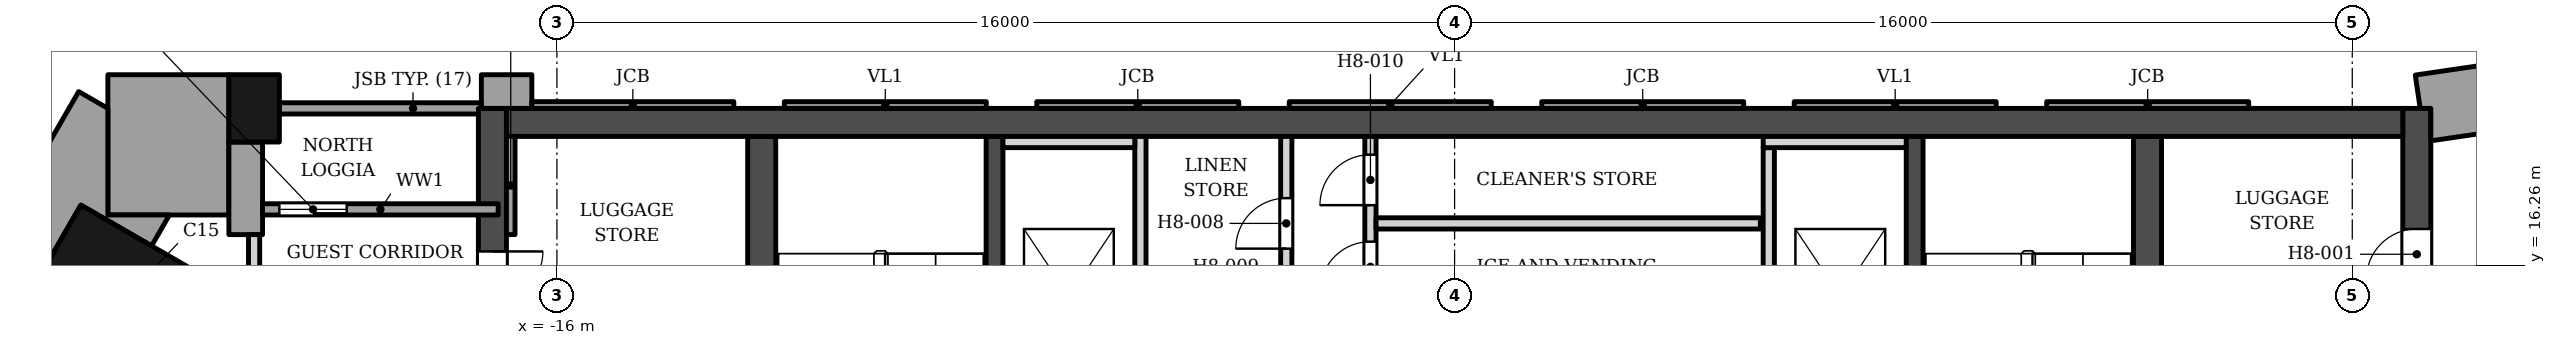
"""IFC4 building model, lengths in metres.
Left out: names, types, materials, properties, quantities, classifications, styles, units other than length and angle.
Written with IfcOpenShell. Run it as: python <this file> out.ifc"""

import sys

from ifc_helpers import new_model, si_unit, direction, frame, frame_2d, origin, origin_2d, place, context, subcontext, project, spatial, polyline, rectangle, outline, extrude, element, fill, save


model = new_model("IFC4")
c1 = context("Model", 3, precision=1e-05, world=origin(), true_north=direction((0.0, 1.0)))
c2 = subcontext(c1, "Body", "Model", "MODEL_VIEW")
j1 = project(units=[si_unit("LENGTHUNIT", "METRE"), si_unit("PLANEANGLEUNIT", "RADIAN")], contexts=[c1])
p1 = place(None, origin())
s1 = spatial("IfcSite", under=j1, at=p1, CompositionType="ELEMENT")
p2 = place(p1, origin())
s2 = spatial("IfcBuilding", under=s1, at=p2, CompositionType="ELEMENT")
p3 = place(p2, frame((0.0, 0.0, 122.4)))
s3 = spatial("IfcBuildingStorey", under=s2, at=p3, CompositionType="ELEMENT", Elevation=122.4)
p4 = place(p3, frame((-16.9, 18.802, 0.0), z_axis=(0.0, 0.0, 1.0), x_axis=(1.0, 0.0, 0.0)))
e1 = element("IfcWall", 1, at=p4, inside=s3, PredefinedType="SHEAR", context=c2, shape_type="SweptSolid", body=[
    extrude(rectangle(XDim=33.8, YDim=0.5, at=frame_2d((16.9, 0.0))), origin(), (0.0, 0.0, 1.0), 3.4),
])
p5 = place(p3, frame((-12.35, 5.253, 0.0), z_axis=(0.0, 0.0, 1.0), x_axis=(0.0, 1.0, 0.0)))
e2 = element("IfcWall", 2, at=p5, inside=s3, PredefinedType="SHEAR", context=c2, shape_type="SweptSolid", body=[
    extrude(rectangle(XDim=13.3, YDim=0.5, at=frame_2d((6.65, 0.0))), origin(), (0.0, 0.0, 1.0), 3.4),
])
p6 = place(p3, frame((-8.2, 5.253, 0.0), z_axis=(0.0, 0.0, 1.0), x_axis=(0.0, 1.0, 0.0)))
e3 = element("IfcWall", 3, at=p6, inside=s3, PredefinedType="SHEAR", context=c2, shape_type="SweptSolid", body=[
    extrude(rectangle(XDim=13.3, YDim=0.3, at=frame_2d((6.65, 0.0))), origin(), (0.0, 0.0, 1.0), 3.4),
])
p7 = place(p6, frame((7.1, 0.0, 0.0)))
e4 = element("IfcOpeningElement", 4, at=p7, cuts=e3, PredefinedType="OPENING", context=c2, shape_type="SweptSolid", body=[
    extrude(rectangle(XDim=1.4, YDim=2.1, at=frame_2d((0.7, 1.05))), frame((0.0, 0.16, 0.0), z_axis=(0.0, -1.0, 0.0), x_axis=(1.0, 0.0, 0.0)), (0.0, 0.0, 1.0), 0.32),
])
p8 = place(p6, frame((5.05, 0.0, 0.0)))
e5 = element("IfcOpeningElement", 5, at=p8, cuts=e3, PredefinedType="OPENING", context=c2, shape_type="SweptSolid", body=[
    extrude(rectangle(XDim=1.4, YDim=2.1, at=frame_2d((0.7, 1.05))), frame((0.0, 0.16, 0.0), z_axis=(0.0, -1.0, 0.0), x_axis=(1.0, 0.0, 0.0)), (0.0, 0.0, 1.0), 0.32),
])
p9 = place(p3, frame((12.35, 5.253, 0.0), z_axis=(0.0, 0.0, 1.0), x_axis=(0.0, 1.0, 0.0)))
e6 = element("IfcWall", 6, at=p9, inside=s3, PredefinedType="SHEAR", context=c2, shape_type="SweptSolid", body=[
    extrude(rectangle(XDim=13.3, YDim=0.5, at=frame_2d((6.65, 0.0))), origin(), (0.0, 0.0, 1.0), 3.4),
])
p10 = place(p3, frame((8.2, 5.253, 0.0), z_axis=(0.0, 0.0, 1.0), x_axis=(0.0, 1.0, 0.0)))
e7 = element("IfcWall", 7, at=p10, inside=s3, PredefinedType="SHEAR", context=c2, shape_type="SweptSolid", body=[
    extrude(rectangle(XDim=13.3, YDim=0.3, at=frame_2d((6.65, 0.0))), origin(), (0.0, 0.0, 1.0), 3.4),
])
p11 = place(p10, frame((7.1, 0.0, 0.0)))
e8 = element("IfcOpeningElement", 8, at=p11, cuts=e7, PredefinedType="OPENING", context=c2, shape_type="SweptSolid", body=[
    extrude(rectangle(XDim=1.4, YDim=2.1, at=frame_2d((0.7, 1.05))), frame((0.0, 0.16, 0.0), z_axis=(0.0, -1.0, 0.0), x_axis=(1.0, 0.0, 0.0)), (0.0, 0.0, 1.0), 0.32),
])
p12 = place(p10, frame((5.05, 0.0, 0.0)))
e9 = element("IfcOpeningElement", 9, at=p12, cuts=e7, PredefinedType="OPENING", context=c2, shape_type="SweptSolid", body=[
    extrude(rectangle(XDim=1.4, YDim=2.1, at=frame_2d((0.7, 1.05))), frame((0.0, 0.16, 0.0), z_axis=(0.0, -1.0, 0.0), x_axis=(1.0, 0.0, 0.0)), (0.0, 0.0, 1.0), 0.32),
])
p13 = place(p3, frame((-17.15, 5.853, 0.0), z_axis=(0.0, 0.0, 1.0), x_axis=(0.0, 1.0, 0.0)))
e10 = element("IfcWall", 10, at=p13, inside=s3, PredefinedType="SHEAR", context=c2, shape_type="SweptSolid", body=[
    extrude(rectangle(XDim=13.2, YDim=0.5, at=frame_2d((6.6, 0.0))), origin(), (0.0, 0.0, 1.0), 3.4),
])
p14 = place(p13, frame((4.1, 0.0, 0.0)))
e11 = element("IfcOpeningElement", 11, at=p14, cuts=e10, PredefinedType="OPENING", context=c2, shape_type="SweptSolid", body=[
    extrude(rectangle(XDim=1.6, YDim=2.1, at=frame_2d((0.8, 1.05))), frame((0.0, 0.26, 0.0), z_axis=(0.0, -1.0, 0.0), x_axis=(1.0, 0.0, 0.0)), (0.0, 0.0, 1.0), 0.52),
])
p15 = place(p13, frame((9.75, 0.0, 0.0)))
e12 = element("IfcOpeningElement", 12, at=p15, cuts=e10, PredefinedType="OPENING", context=c2, shape_type="SweptSolid", body=[
    extrude(rectangle(XDim=0.9, YDim=2.1, at=frame_2d((0.45, 1.05))), frame((0.0, 0.26, 0.0), z_axis=(0.0, -1.0, 0.0), x_axis=(1.0, 0.0, 0.0)), (0.0, 0.0, 1.0), 0.52),
])
p16 = place(p3, frame((17.15, 5.853, 0.0), z_axis=(0.0, 0.0, 1.0), x_axis=(0.0, 1.0, 0.0)))
e13 = element("IfcWall", 13, at=p16, inside=s3, PredefinedType="SHEAR", context=c2, shape_type="SweptSolid", body=[
    extrude(rectangle(XDim=13.2, YDim=0.5, at=frame_2d((6.6, 0.0))), origin(), (0.0, 0.0, 1.0), 3.4),
])
p17 = place(p16, frame((4.1, 0.0, 0.0)))
e14 = element("IfcOpeningElement", 14, at=p17, cuts=e13, PredefinedType="OPENING", context=c2, shape_type="SweptSolid", body=[
    extrude(rectangle(XDim=1.6, YDim=2.1, at=frame_2d((0.8, 1.05))), frame((0.0, 0.26, 0.0), z_axis=(0.0, -1.0, 0.0), x_axis=(1.0, 0.0, 0.0)), (0.0, 0.0, 1.0), 0.52),
])
p18 = place(p16, frame((10.15, 0.0, 0.0)))
e15 = element("IfcOpeningElement", 15, at=p18, cuts=e13, PredefinedType="OPENING", context=c2, shape_type="SweptSolid", body=[
    extrude(rectangle(XDim=0.9, YDim=2.1, at=frame_2d((0.45, 1.05))), frame((0.0, 0.26, 0.0), z_axis=(0.0, -1.0, 0.0), x_axis=(1.0, 0.0, 0.0)), (0.0, 0.0, 1.0), 0.52),
])
p19 = place(p3, frame((-23.963, 15.382, 0.0), z_axis=(0.0, 0.0, 1.0), x_axis=(0.866025403784, -0.5, 0.0)))
e16 = element("IfcColumn", 16, at=p19, inside=s3, PredefinedType="COLUMN", context=c2, shape_type="SweptSolid", body=[
    extrude(rectangle(XDim=2.85, YDim=2.85, at=origin_2d()), origin(), (0.0, 0.0, 1.0), 3.4),
])
p20 = place(p3, frame((-21.397, 19.053, 0.0), z_axis=(0.0, 0.0, 1.0), x_axis=(-1.0, 0.0, 0.0)))
e17 = element("IfcColumn", 17, at=p20, inside=s3, PredefinedType="COLUMN", context=c2, shape_type="SweptSolid", body=[
    extrude(rectangle(XDim=0.9, YDim=1.2, at=origin_2d()), origin(), (0.0, 0.0, 1.0), 3.4),
])
p21 = place(p3, origin())
e18 = element("IfcWall", 18, at=p21, inside=s3, PredefinedType="SOLIDWALL", context=c2, shape_type="SweptSolid", body=[
    extrude(outline(polyline([(-16.447, 19.052), (-16.447, 19.653), (-17.347, 19.653), (-17.347, 19.052), (-16.447, 19.052)])), origin(), (0.0, 0.0, 1.0), 2.65),
])
p22 = place(p3, origin())
e19 = element("IfcWall", 19, at=p22, inside=s3, PredefinedType="SOLIDWALL", context=c2, shape_type="SweptSolid", body=[
    extrude(outline(polyline([(-16.9, 18.555), (-16.747, 18.555), (-16.747, 16.802), (-16.9, 16.802), (-16.9, 18.555)])), origin(), (0.0, 0.0, 1.0), 2.65),
])
p23 = place(p3, origin())
e20 = element("IfcWall", 20, at=p23, inside=s3, PredefinedType="SOLIDWALL", context=c2, shape_type="SweptSolid", body=[
    extrude(outline(polyline([(-21.847, 18.453), (-21.847, 16.802), (-21.247, 16.802), (-21.247, 18.453), (-21.847, 18.453)])), origin(), (0.0, 0.0, 1.0), 2.63),
])
p24 = place(p3, origin())
e21 = element("IfcWall", 21, at=p24, inside=s3, PredefinedType="SOLIDWALL", context=c2, shape_type="SweptSolid", body=[
    extrude(outline(polyline([(10.553, 19.173), (10.553, 19.052), (14.153, 19.052), (14.153, 19.173), (10.553, 19.173)])), origin(), (0.0, 0.0, 1.0), 2.65),
])
p25 = place(p3, origin())
e22 = element("IfcWall", 22, at=p25, inside=s3, PredefinedType="ELEMENTEDWALL", context=c2, shape_type="SweptSolid", body=[
    extrude(outline(polyline([(6.053, 19.173), (6.053, 19.052), (9.653, 19.052), (9.653, 19.173), (6.053, 19.173)])), origin(), (0.0, 0.0, 1.0), 2.65),
])
p26 = place(p3, origin())
e23 = element("IfcWall", 23, at=p26, inside=s3, PredefinedType="SOLIDWALL", context=c2, shape_type="SweptSolid", body=[
    extrude(outline(polyline([(1.553, 19.173), (1.553, 19.052), (5.153, 19.052), (5.153, 19.173), (1.553, 19.173)])), origin(), (0.0, 0.0, 1.0), 2.65),
])
p27 = place(p3, origin())
e24 = element("IfcWall", 24, at=p27, inside=s3, PredefinedType="ELEMENTEDWALL", context=c2, shape_type="SweptSolid", body=[
    extrude(outline(polyline([(-2.947, 19.173), (-2.947, 19.052), (0.653, 19.052), (0.653, 19.173), (-2.947, 19.173)])), origin(), (0.0, 0.0, 1.0), 2.65),
])
p28 = place(p3, origin())
e25 = element("IfcWall", 25, at=p28, inside=s3, PredefinedType="SOLIDWALL", context=c2, shape_type="SweptSolid", body=[
    extrude(outline(polyline([(-7.447, 19.173), (-7.447, 19.052), (-3.847, 19.052), (-3.847, 19.173), (-7.447, 19.173)])), origin(), (0.0, 0.0, 1.0), 2.65),
])
p29 = place(p3, origin())
e26 = element("IfcWall", 26, at=p29, inside=s3, PredefinedType="ELEMENTEDWALL", context=c2, shape_type="SweptSolid", body=[
    extrude(outline(polyline([(-11.947, 19.173), (-11.947, 19.052), (-8.347, 19.052), (-8.347, 19.173), (-11.947, 19.173)])), origin(), (0.0, 0.0, 1.0), 2.65),
])
p30 = place(p3, origin())
e27 = element("IfcWall", 27, at=p30, inside=s3, PredefinedType="SOLIDWALL", context=c2, shape_type="SweptSolid", body=[
    extrude(outline(polyline([(-16.446, 19.173), (-16.446, 19.052), (-12.847, 19.052), (-12.847, 19.173), (-16.446, 19.173)])), origin(), (0.0, 0.0, 1.0), 2.65),
])
p31 = place(p3, origin())
e28 = element("IfcWall", 28, at=p31, inside=s3, PredefinedType="SOLIDWALL", context=c2, shape_type="SweptSolid", body=[
    extrude(outline(polyline([(-20.947, 19.153), (-20.947, 18.953), (-17.4, 18.953), (-17.4, 19.052), (-17.347, 19.052), (-17.347, 19.153), (-20.947, 19.153)])), origin(), (0.0, 0.0, 1.0), 2.65),
])
p32 = place(p3, frame((-17.047, 17.252, 0.0), z_axis=(0.0, 0.0, 1.0), x_axis=(-1.0, 0.0, 0.0)))
e29 = element("IfcWall", 29, at=p32, inside=s3, PredefinedType="ELEMENTEDWALL", context=c2, shape_type="SweptSolid", body=[
    extrude(rectangle(XDim=4.2, YDim=0.2, at=frame_2d((2.1, 0.0))), origin(), (0.0, 0.0, 1.0), 2.65),
])
p33 = place(p32, frame((2.7, 0.0, 0.0)))
e30 = element("IfcOpeningElement", 30, at=p33, cuts=e29, PredefinedType="OPENING", context=c2, shape_type="SweptSolid", body=[
    extrude(rectangle(XDim=1.2, YDim=2.4, at=frame_2d((0.6, 1.2))), frame((0.0, 0.11, 0.0), z_axis=(0.0, -1.0, 0.0), x_axis=(1.0, 0.0, 0.0)), (0.0, 0.0, 1.0), 0.22),
])
p34 = place(p3, origin())
e31 = element("IfcWall", 31, at=p34, inside=s3, PredefinedType="SOLIDWALL", context=c2, shape_type="SweptSolid", body=[
    extrude(outline(polyline([(-24.004, 17.153), (-21.847, 17.153), (-21.847, 18.453), (-21.847, 18.453), (-21.847, 19.653), (-24.004, 19.653), (-24.004, 17.153)])), origin(), (0.0, 0.0, 1.0), 2.63),
])
p35 = place(p3, origin())
e32 = element("IfcWall", 32, at=p35, inside=s3, PredefinedType="SOLIDWALL", context=c2, shape_type="SweptSolid", body=[
    extrude(outline(polyline([(-23.225, 16.601), (-22.907, 17.153), (-24.004, 17.153), (-24.004, 19.052), (-24.523, 19.353), (-27.682, 13.882), (-25.664, 12.717), (-24.65, 14.133), (-25.91, 14.86), (-24.485, 17.329), (-23.225, 16.601)])), origin(), (0.0, 0.0, 1.0), 2.63),
])
p36 = place(p3, origin())
e33 = element("IfcWall", 33, at=p36, inside=s3, PredefinedType="SOLIDWALL", context=c2, shape_type="SweptSolid", body=[
    extrude(outline(polyline([(17.123, 19.646), (17.21, 19.052), (17.4, 19.052), (17.4, 18.474), (18.664, 18.659), (18.49, 19.847), (17.123, 19.646)])), origin(), (0.0, 0.0, 1.0), 2.65),
])
p37 = place(p3, frame((-5.6, 14.253, 0.0), z_axis=(0.0, 0.0, 1.0), x_axis=(0.0, 1.0, 0.0)))
e34 = element("IfcWall", 34, at=p37, inside=s3, PredefinedType="SOLIDWALL", context=c2, shape_type="SweptSolid", body=[
    extrude(rectangle(XDim=4.3, YDim=0.2, at=frame_2d((2.15, 0.0))), origin(), (0.0, 0.0, 1.0), 3.23),
])
p38 = place(p3, frame((5.6, 15.453, 0.0), z_axis=(0.0, 0.0, 1.0), x_axis=(0.0, 1.0, 0.0)))
e35 = element("IfcWall", 35, at=p38, inside=s3, PredefinedType="SOLIDWALL", context=c2, shape_type="SweptSolid", body=[
    extrude(rectangle(XDim=2.9, YDim=0.2, at=frame_2d((1.45, 0.0))), origin(), (0.0, 0.0, 1.0), 3.23),
])
p39 = place(p3, frame((-3.0, 15.503, 0.0), z_axis=(0.0, 0.0, 1.0), x_axis=(0.0, 1.0, 0.0)))
e36 = element("IfcWall", 36, at=p39, inside=s3, PredefinedType="SOLIDWALL", context=c2, shape_type="SweptSolid", body=[
    extrude(rectangle(XDim=3.05, YDim=0.2, at=frame_2d((1.525, 0.0))), origin(), (0.0, 0.0, 1.0), 3.23),
])
p40 = place(p39, frame((1.05, 0.0, 0.0)))
e37 = element("IfcOpeningElement", 37, at=p40, cuts=e36, PredefinedType="OPENING", context=c2, shape_type="SweptSolid", body=[
    extrude(rectangle(XDim=0.9, YDim=2.1, at=frame_2d((0.45, 1.05))), frame((0.0, 0.11, 0.0), z_axis=(0.0, -1.0, 0.0), x_axis=(1.0, 0.0, 0.0)), (0.0, 0.0, 1.0), 0.22),
])
p41 = place(p3, frame((-1.5, 15.503, 0.0), z_axis=(0.0, 0.0, 1.0), x_axis=(0.0, 1.0, 0.0)))
e38 = element("IfcWall", 38, at=p41, inside=s3, PredefinedType="SOLIDWALL", context=c2, shape_type="SweptSolid", body=[
    extrude(rectangle(XDim=3.05, YDim=0.2, at=frame_2d((1.525, 0.0))), origin(), (0.0, 0.0, 1.0), 3.23),
])
p42 = place(p41, frame((0.275, 0.0, 0.0)))
e39 = element("IfcOpeningElement", 39, at=p42, cuts=e38, PredefinedType="OPENING", context=c2, shape_type="SweptSolid", body=[
    extrude(rectangle(XDim=0.9, YDim=2.1, at=frame_2d((0.45, 1.05))), frame((0.0, 0.11, 0.0), z_axis=(0.0, -1.0, 0.0), x_axis=(1.0, 0.0, 0.0)), (0.0, 0.0, 1.0), 0.22),
])
p43 = place(p41, frame((1.825, 0.0, 0.0)))
e40 = element("IfcOpeningElement", 40, at=p43, cuts=e38, PredefinedType="OPENING", context=c2, shape_type="SweptSolid", body=[
    extrude(rectangle(XDim=0.9, YDim=2.1, at=frame_2d((0.45, 1.05))), frame((0.0, 0.11, 0.0), z_axis=(0.0, -1.0, 0.0), x_axis=(1.0, 0.0, 0.0)), (0.0, 0.0, 1.0), 0.22),
])
p44 = place(p3, frame((-1.4, 17.003, 0.0), z_axis=(0.0, 0.0, 1.0), x_axis=(1.0, 0.0, 0.0)))
e41 = element("IfcWall", 41, at=p44, inside=s3, PredefinedType="SOLIDWALL", context=c2, shape_type="SweptSolid", body=[
    extrude(rectangle(XDim=6.85, YDim=0.2, at=frame_2d((3.425, 0.0))), origin(), (0.0, 0.0, 1.0), 3.23),
])
p45 = place(p3, frame((-8.05, 18.453, 0.0), z_axis=(0.0, 0.0, 1.0), x_axis=(1.0, 0.0, 0.0)))
e42 = element("IfcWall", 42, at=p45, inside=s3, PredefinedType="SOLIDWALL", context=c2, shape_type="SweptSolid", body=[
    extrude(rectangle(XDim=2.35, YDim=0.2, at=frame_2d((1.175, 0.0))), origin(), (0.0, 0.0, 1.0), 3.23),
])
p46 = place(p3, frame((5.5, 18.453, 0.0), z_axis=(0.0, 0.0, 1.0), x_axis=(1.0, 0.0, 0.0)))
e43 = element("IfcWall", 43, at=p46, inside=s3, PredefinedType="SOLIDWALL", context=c2, shape_type="SweptSolid", body=[
    extrude(rectangle(XDim=2.55, YDim=0.2, at=frame_2d((1.275, 0.0))), origin(), (0.0, 0.0, 1.0), 3.23),
])
p47 = place(p3, frame((-21.397, 16.802, 0.0), z_axis=(0.0, 0.0, 1.0), x_axis=(0.000157480313, -0.9999999876, 0.0)))
e44 = element("IfcWall", 44, at=p47, inside=s3, PredefinedType="PARTITIONING", context=c2, shape_type="SweptSolid", body=[
    extrude(rectangle(XDim=1.55, YDim=0.2, at=frame_2d((0.775, 0.0))), origin(), (0.0, 0.0, 1.0), 3.23),
])
p48 = place(p33, origin())
e45 = element("IfcDoor", 45, at=p48, inside=s3, OperationType="SINGLE_SWING_LEFT", PredefinedType="DOOR", context=c2, shape_type="SweptSolid", body=[
    extrude(rectangle(XDim=1.2, YDim=2.4, at=frame_2d((0.6, 1.2))), frame((0.0, 0.025, 0.0), z_axis=(0.0, -1.0, 0.0), x_axis=(1.0, 0.0, 0.0)), (0.0, 0.0, 1.0), 0.05),
])
fill(e30, e45)
p49 = place(p40, origin())
e46 = element("IfcDoor", 46, at=p49, inside=s3, OperationType="SINGLE_SWING_LEFT", PredefinedType="DOOR", context=c2, shape_type="SweptSolid", body=[
    extrude(rectangle(XDim=0.9, YDim=2.1, at=frame_2d((0.45, 1.05))), frame((0.0, 0.025, 0.0), z_axis=(0.0, -1.0, 0.0), x_axis=(1.0, 0.0, 0.0)), (0.0, 0.0, 1.0), 0.05),
])
fill(e37, e46)
p50 = place(p42, origin())
e47 = element("IfcDoor", 47, at=p50, inside=s3, OperationType="SINGLE_SWING_LEFT", PredefinedType="DOOR", context=c2, shape_type="SweptSolid", body=[
    extrude(rectangle(XDim=0.9, YDim=2.1, at=frame_2d((0.45, 1.05))), frame((0.0, 0.025, 0.0), z_axis=(0.0, -1.0, 0.0), x_axis=(1.0, 0.0, 0.0)), (0.0, 0.0, 1.0), 0.05),
])
fill(e39, e47)
p51 = place(p43, origin())
e48 = element("IfcDoor", 48, at=p51, inside=s3, OperationType="SINGLE_SWING_LEFT", PredefinedType="DOOR", context=c2, shape_type="SweptSolid", body=[
    extrude(rectangle(XDim=0.9, YDim=2.1, at=frame_2d((0.45, 1.05))), frame((0.0, 0.025, 0.0), z_axis=(0.0, -1.0, 0.0), x_axis=(1.0, 0.0, 0.0)), (0.0, 0.0, 1.0), 0.05),
])
fill(e40, e48)
p52 = place(p15, origin())
e49 = element("IfcDoor", 49, at=p52, inside=s3, OperationType="SINGLE_SWING_RIGHT", PredefinedType="DOOR", context=c2, shape_type="SweptSolid", body=[
    extrude(rectangle(XDim=0.9, YDim=2.1, at=frame_2d((0.45, 1.05))), frame((0.0, 0.025, 0.0), z_axis=(0.0, -1.0, 0.0), x_axis=(1.0, 0.0, 0.0)), (0.0, 0.0, 1.0), 0.05),
])
fill(e12, e49)
p53 = place(p18, origin())
e50 = element("IfcDoor", 50, at=p53, inside=s3, OperationType="SINGLE_SWING_LEFT", PredefinedType="DOOR", context=c2, shape_type="SweptSolid", body=[
    extrude(rectangle(XDim=0.9, YDim=2.1, at=frame_2d((0.45, 1.05))), frame((0.0, 0.025, 0.0), z_axis=(0.0, -1.0, 0.0), x_axis=(1.0, 0.0, 0.0)), (0.0, 0.0, 1.0), 0.05),
])
fill(e15, e50)
save(model, sys.argv[1])
